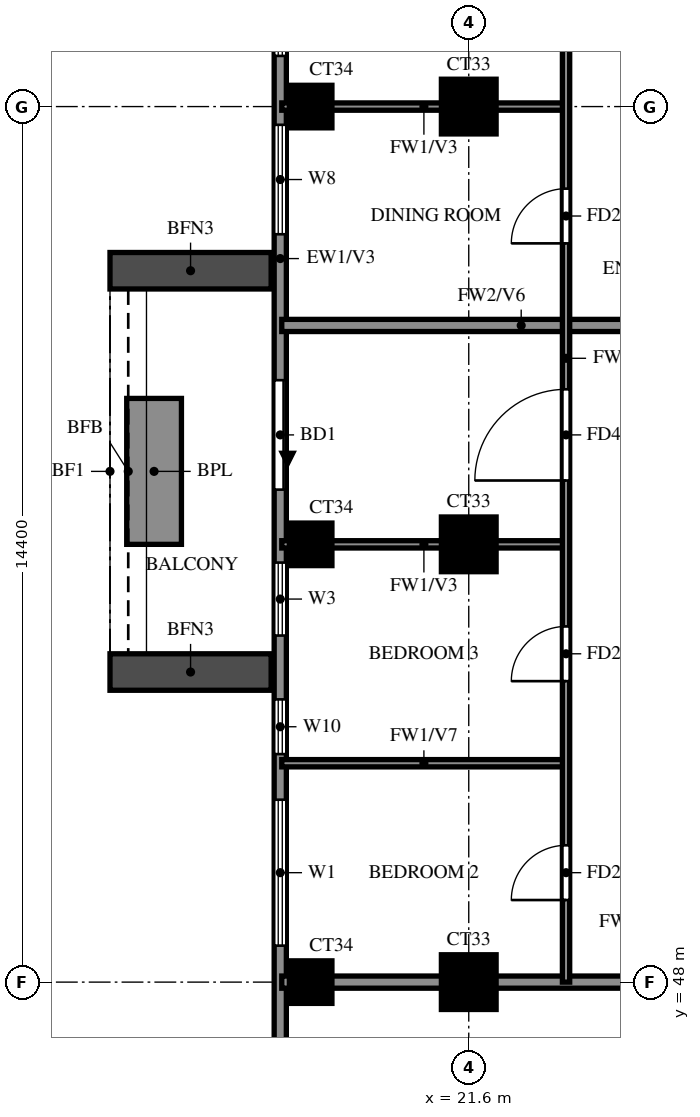
"""IFC4 building model, lengths in metres.
Left out: names, types, materials, properties, quantities, classifications, styles, units other than length and angle.
Written with IfcOpenShell. Run it as: python <this file> out.ifc"""

import sys

from ifc_helpers import new_model, si_unit, direction, frame, frame_2d, origin, origin_2d, place, context, subcontext, project, spatial, rectangle, extrude, source, transform, mapped, element, fill, save


model = new_model("IFC4")
c1 = context("Model", 3, precision=1e-05, world=origin(), true_north=direction((0.0, 1.0)))
c2 = subcontext(c1, "Body", "Model", "MODEL_VIEW")
j1 = project(units=[si_unit("LENGTHUNIT", "METRE"), si_unit("PLANEANGLEUNIT", "RADIAN")], contexts=[c1])
p1 = place(None, origin())
s1 = spatial("IfcSite", under=j1, at=p1, CompositionType="ELEMENT")
p2 = place(p1, origin())
s2 = spatial("IfcBuilding", under=s1, at=p2, CompositionType="ELEMENT")
p3 = place(p2, frame((0.0, 0.0, 218.5)))
s3 = spatial("IfcBuildingStorey", under=s2, at=p3, CompositionType="ELEMENT", Elevation=218.5)
m1 = source(origin(), c2, "Body", "SweptSolid", [
    extrude(rectangle(XDim=0.7, YDim=0.7, at=origin_2d()), origin(), (0.0, 0.0, 1.0), 3.22),
])
p4 = place(p3, frame((19.0, 48.0, 0.0), z_axis=(0.0, 0.0, 1.0), x_axis=(1.0, 0.0, 0.0)))
e1 = element("IfcColumn", 1, at=p4, inside=s3, PredefinedType="COLUMN", context=c2, shape_type="MappedRepresentation", body=[
    mapped(m1, transform((0.0, 0.0, 0.0))),
])
m2 = source(origin(), c2, "Body", "SweptSolid", [
    extrude(rectangle(XDim=0.9, YDim=0.9, at=origin_2d()), origin(), (0.0, 0.0, 1.0), 3.22),
])
p5 = place(p3, frame((21.6, 48.0, 0.0), z_axis=(0.0, 0.0, 1.0), x_axis=(1.0, 0.0, 0.0)))
e2 = element("IfcColumn", 2, at=p5, inside=s3, PredefinedType="COLUMN", context=c2, shape_type="MappedRepresentation", body=[
    mapped(m2, transform((0.0, 0.0, 0.0))),
])
p6 = place(p3, frame((19.0, 55.2, 0.0), z_axis=(0.0, 0.0, 1.0), x_axis=(1.0, 0.0, 0.0)))
e3 = element("IfcColumn", 3, at=p6, inside=s3, PredefinedType="COLUMN", context=c2, shape_type="MappedRepresentation", body=[
    mapped(m1, transform((0.0, 0.0, 0.0))),
])
p7 = place(p3, frame((21.6, 55.2, 0.0), z_axis=(0.0, 0.0, 1.0), x_axis=(1.0, 0.0, 0.0)))
e4 = element("IfcColumn", 4, at=p7, inside=s3, PredefinedType="COLUMN", context=c2, shape_type="MappedRepresentation", body=[
    mapped(m2, transform((0.0, 0.0, 0.0))),
])
p8 = place(p3, frame((19.0, 62.4, 0.0), z_axis=(0.0, 0.0, 1.0), x_axis=(1.0, 0.0, 0.0)))
e5 = element("IfcColumn", 5, at=p8, inside=s3, PredefinedType="COLUMN", context=c2, shape_type="MappedRepresentation", body=[
    mapped(m1, transform((0.0, 0.0, 0.0))),
])
p9 = place(p3, frame((21.6, 62.4, 0.0), z_axis=(0.0, 0.0, 1.0), x_axis=(1.0, 0.0, 0.0)))
e6 = element("IfcColumn", 6, at=p9, inside=s3, PredefinedType="COLUMN", context=c2, shape_type="MappedRepresentation", body=[
    mapped(m2, transform((0.0, 0.0, 0.0))),
])
p10 = place(p3, frame((18.5, 76.6, 0.0), z_axis=(0.0, 0.0, 1.0), x_axis=(0.0, -1.0, 0.0)))
e7 = element("IfcWall", 7, at=p10, inside=s3, PredefinedType="SOLIDWALL", context=c2, shape_type="SweptSolid", body=[
    extrude(rectangle(XDim=33.4, YDim=0.2, at=frame_2d((16.7, 0.0))), origin(), (0.0, 0.0, 1.0), 3.22),
])
p11 = place(p10, frame((18.7, 0.0, 0.0)))
e8 = element("IfcOpeningElement", 8, at=p11, cuts=e7, PredefinedType="OPENING", context=c2, shape_type="SweptSolid", body=[
    extrude(rectangle(XDim=1.8, YDim=2.4, at=frame_2d((0.9, 1.2))), frame((0.0, 0.11, 0.0), z_axis=(0.0, -1.0, 0.0), x_axis=(1.0, 0.0, 0.0)), (0.0, 0.0, 1.0), 0.22),
])
p12 = place(p10, frame((29.7, 0.0, 0.6)))
e9 = element("IfcOpeningElement", 9, at=p12, cuts=e7, PredefinedType="OPENING", context=c2, shape_type="SweptSolid", body=[
    extrude(rectangle(XDim=2.4, YDim=2.4, at=frame_2d((1.2, 1.2))), frame((0.0, 0.11, 0.0), z_axis=(0.0, -1.0, 0.0), x_axis=(1.0, 0.0, 0.0)), (0.0, 0.0, 1.0), 0.22),
])
p13 = place(p10, frame((25.6, 0.0, 0.6)))
e10 = element("IfcOpeningElement", 10, at=p13, cuts=e7, PredefinedType="OPENING", context=c2, shape_type="SweptSolid", body=[
    extrude(rectangle(XDim=2.4, YDim=2.4, at=frame_2d((1.2, 1.2))), frame((0.0, 0.11, 0.0), z_axis=(0.0, -1.0, 0.0), x_axis=(1.0, 0.0, 0.0)), (0.0, 0.0, 1.0), 0.22),
])
p14 = place(p10, frame((21.7, 0.0, 0.6)))
e11 = element("IfcOpeningElement", 11, at=p14, cuts=e7, PredefinedType="OPENING", context=c2, shape_type="SweptSolid", body=[
    extrude(rectangle(XDim=1.2, YDim=2.4, at=frame_2d((0.6, 1.2))), frame((0.0, 0.11, 0.0), z_axis=(0.0, -1.0, 0.0), x_axis=(1.0, 0.0, 0.0)), (0.0, 0.0, 1.0), 0.22),
])
p15 = place(p10, frame((23.95, 0.0, 0.6)))
e12 = element("IfcOpeningElement", 12, at=p15, cuts=e7, PredefinedType="OPENING", context=c2, shape_type="SweptSolid", body=[
    extrude(rectangle(XDim=0.9, YDim=2.4, at=frame_2d((0.45, 1.2))), frame((0.0, 0.11, 0.0), z_axis=(0.0, -1.0, 0.0), x_axis=(1.0, 0.0, 0.0)), (0.0, 0.0, 1.0), 0.22),
])
p16 = place(p10, frame((14.5, 0.0, 0.6)))
e13 = element("IfcOpeningElement", 13, at=p16, cuts=e7, PredefinedType="OPENING", context=c2, shape_type="SweptSolid", body=[
    extrude(rectangle(XDim=1.8, YDim=2.4, at=frame_2d((0.9, 1.2))), frame((0.0, 0.11, 0.0), z_axis=(0.0, -1.0, 0.0), x_axis=(1.0, 0.0, 0.0)), (0.0, 0.0, 1.0), 0.22),
])
p17 = place(p10, frame((7.833, 0.0, 0.6)))
e14 = element("IfcOpeningElement", 14, at=p17, cuts=e7, PredefinedType="OPENING", context=c2, shape_type="SweptSolid", body=[
    extrude(rectangle(XDim=2.4, YDim=2.4, at=frame_2d((1.2, 1.2))), frame((0.0, 0.11, 0.0), z_axis=(0.0, -1.0, 0.0), x_axis=(1.0, 0.0, 0.0)), (0.0, 0.0, 1.0), 0.22),
])
p18 = place(p10, frame((10.967, 0.0, 0.6)))
e15 = element("IfcOpeningElement", 15, at=p18, cuts=e7, PredefinedType="OPENING", context=c2, shape_type="SweptSolid", body=[
    extrude(rectangle(XDim=2.4, YDim=2.4, at=frame_2d((1.2, 1.2))), frame((0.0, 0.11, 0.0), z_axis=(0.0, -1.0, 0.0), x_axis=(1.0, 0.0, 0.0)), (0.0, 0.0, 1.0), 0.22),
])
p19 = place(p10, frame((4.75, 0.0, 1.5)))
e16 = element("IfcOpeningElement", 16, at=p19, cuts=e7, PredefinedType="OPENING", context=c2, shape_type="SweptSolid", body=[
    extrude(rectangle(XDim=0.9, YDim=0.9, at=frame_2d((0.45, 0.45))), frame((0.0, 0.11, 0.0), z_axis=(0.0, -1.0, 0.0), x_axis=(1.0, 0.0, 0.0)), (0.0, 0.0, 1.0), 0.22),
])
p20 = place(p10, frame((0.6, 0.0, 0.6)))
e17 = element("IfcOpeningElement", 17, at=p20, cuts=e7, PredefinedType="OPENING", context=c2, shape_type="SweptSolid", body=[
    extrude(rectangle(XDim=2.4, YDim=2.4, at=frame_2d((1.2, 1.2))), frame((0.0, 0.11, 0.0), z_axis=(0.0, -1.0, 0.0), x_axis=(1.0, 0.0, 0.0)), (0.0, 0.0, 1.0), 0.22),
])
for number, where, z_axis, x_axis in (
    (18, (18.35, 59.7, 0.0), (0.0, 0.0, 1.0), (-1.0, 0.0, 0.0)),
    (19, (18.35, 53.1, 0.0), (0.0, 0.0, 1.0), (-1.0, 0.0, 0.0)),
):
    element("IfcWall", number, at=place(p3, frame(where, z_axis=z_axis, x_axis=x_axis)), inside=s3, PredefinedType="SOLIDWALL", context=c2, shape_type="SweptSolid", body=[
        extrude(rectangle(XDim=2.65, YDim=0.6, at=frame_2d((1.325, 0.0))), origin(), (0.0, 0.0, 1.0), 2.85),
    ])
p21 = place(p3, frame((16.425, 57.6, 0.0), z_axis=(0.0, 0.0, 1.0), x_axis=(0.0, -1.0, 0.0)))
e20 = element("IfcWall", 20, at=p21, inside=s3, PredefinedType="SOLIDWALL", context=c2, shape_type="SweptSolid", body=[
    extrude(rectangle(XDim=2.4, YDim=0.9, at=frame_2d((1.2, 0.0))), origin(), (0.0, 0.0, 1.0), 0.9),
])
p22 = place(p3, frame((18.525, 48.0, 0.0), z_axis=(0.0, 0.0, 1.0), x_axis=(1.0, 0.0, 0.0)))
e21 = element("IfcWall", 21, at=p22, inside=s3, PredefinedType="SOLIDWALL", context=c2, shape_type="SweptSolid", body=[
    extrude(rectangle(XDim=15.075, YDim=0.2, at=frame_2d((7.538, 0.0))), origin(), (0.0, 0.0, 1.0), 3.22),
])
p23 = place(p3, frame((18.525, 58.8, 0.0), z_axis=(0.0, 0.0, 1.0), x_axis=(1.0, 0.0, 0.0)))
e22 = element("IfcWall", 22, at=p23, inside=s3, PredefinedType="SOLIDWALL", context=c2, shape_type="SweptSolid", body=[
    extrude(rectangle(XDim=7.875, YDim=0.2, at=frame_2d((3.938, 0.0))), origin(), (0.0, 0.0, 1.0), 2.32),
])
p24 = place(p3, frame((18.525, 51.6, 0.0), z_axis=(0.0, 0.0, 1.0), x_axis=(1.0, 0.0, 0.0)))
e23 = element("IfcWall", 23, at=p24, inside=s3, PredefinedType="PARTITIONING", context=c2, shape_type="SweptSolid", body=[
    extrude(rectangle(XDim=4.675, YDim=0.12, at=frame_2d((2.337, 0.0))), origin(), (0.0, 0.0, 1.0), 2.32),
])
for number, where, z_axis, x_axis in (
    (24, (18.525, 55.2, 0.0), (0.0, 0.0, 1.0), (1.0, 0.0, 0.0)),
    (25, (18.525, 62.4, 0.0), (0.0, 0.0, 1.0), (1.0, 0.0, 0.0)),
):
    element("IfcWall", number, at=place(p3, frame(where, z_axis=z_axis, x_axis=x_axis)), inside=s3, PredefinedType="PARTITIONING", context=c2, shape_type="SweptSolid", body=[
        extrude(rectangle(XDim=4.675, YDim=0.12, at=frame_2d((2.337, 0.0))), origin(), (0.0, 0.0, 1.0), 3.22),
    ])
p25 = place(p3, frame((23.2, 48.0, 0.0), z_axis=(0.0, 0.0, 1.0), x_axis=(0.0, 1.0, 0.0)))
e26 = element("IfcWall", 26, at=p25, inside=s3, PredefinedType="PARTITIONING", context=c2, shape_type="SweptSolid", body=[
    extrude(rectangle(XDim=21.6, YDim=0.12, at=frame_2d((10.8, 0.0))), origin(), (0.0, 0.0, 1.0), 3.22),
])
p26 = place(p25, frame((1.35, 0.0, 0.0)))
e27 = element("IfcOpeningElement", 27, at=p26, cuts=e26, PredefinedType="OPENING", context=c2, shape_type="SweptSolid", body=[
    extrude(rectangle(XDim=0.9, YDim=2.1, at=frame_2d((0.45, 1.05))), frame((0.0, 0.07, 0.0), z_axis=(0.0, -1.0, 0.0), x_axis=(1.0, 0.0, 0.0)), (0.0, 0.0, 1.0), 0.14),
])
p27 = place(p25, frame((4.95, 0.0, 0.0)))
e28 = element("IfcOpeningElement", 28, at=p27, cuts=e26, PredefinedType="OPENING", context=c2, shape_type="SweptSolid", body=[
    extrude(rectangle(XDim=0.9, YDim=2.1, at=frame_2d((0.45, 1.05))), frame((0.0, 0.07, 0.0), z_axis=(0.0, -1.0, 0.0), x_axis=(1.0, 0.0, 0.0)), (0.0, 0.0, 1.0), 0.14),
])
p28 = place(p25, frame((8.25, 0.0, 0.0)))
e29 = element("IfcOpeningElement", 29, at=p28, cuts=e26, PredefinedType="OPENING", context=c2, shape_type="SweptSolid", body=[
    extrude(rectangle(XDim=1.5, YDim=2.1, at=frame_2d((0.75, 1.05))), frame((0.0, 0.07, 0.0), z_axis=(0.0, -1.0, 0.0), x_axis=(1.0, 0.0, 0.0)), (0.0, 0.0, 1.0), 0.14),
])
p29 = place(p25, frame((12.15, 0.0, 0.0)))
e30 = element("IfcOpeningElement", 30, at=p29, cuts=e26, PredefinedType="OPENING", context=c2, shape_type="SweptSolid", body=[
    extrude(rectangle(XDim=0.9, YDim=2.1, at=frame_2d((0.45, 1.05))), frame((0.0, 0.07, 0.0), z_axis=(0.0, -1.0, 0.0), x_axis=(1.0, 0.0, 0.0)), (0.0, 0.0, 1.0), 0.14),
])
p30 = place(p25, frame((17.55, 0.0, 0.0)))
e31 = element("IfcOpeningElement", 31, at=p30, cuts=e26, PredefinedType="OPENING", context=c2, shape_type="SweptSolid", body=[
    extrude(rectangle(XDim=0.9, YDim=2.1, at=frame_2d((0.45, 1.05))), frame((0.0, 0.07, 0.0), z_axis=(0.0, -1.0, 0.0), x_axis=(1.0, 0.0, 0.0)), (0.0, 0.0, 1.0), 0.14),
])
p31 = place(p11, origin())
e32 = element("IfcDoor", 32, at=p31, inside=s3, OperationType="DOUBLE_DOOR_SLIDING", PredefinedType="DOOR", context=c2, shape_type="SweptSolid", body=[
    extrude(rectangle(XDim=1.8, YDim=2.4, at=frame_2d((0.9, 1.2))), frame((0.0, 0.025, 0.0), z_axis=(0.0, -1.0, 0.0), x_axis=(1.0, 0.0, 0.0)), (0.0, 0.0, 1.0), 0.05),
])
fill(e8, e32)
p32 = place(p13, origin())
e33 = element("IfcWindow", 33, at=p32, inside=s3, PartitioningType="DOUBLE_PANEL_VERTICAL", PredefinedType="WINDOW", context=c2, shape_type="SweptSolid", body=[
    extrude(rectangle(XDim=2.4, YDim=2.4, at=frame_2d((1.2, 1.2))), frame((0.0, 0.03, 0.0), z_axis=(0.0, -1.0, 0.0), x_axis=(1.0, 0.0, 0.0)), (0.0, 0.0, 1.0), 0.06),
])
fill(e10, e33)
p33 = place(p14, origin())
e34 = element("IfcWindow", 34, at=p33, inside=s3, PartitioningType="SINGLE_PANEL", PredefinedType="WINDOW", context=c2, shape_type="SweptSolid", body=[
    extrude(rectangle(XDim=1.2, YDim=2.4, at=frame_2d((0.6, 1.2))), frame((0.0, 0.03, 0.0), z_axis=(0.0, -1.0, 0.0), x_axis=(1.0, 0.0, 0.0)), (0.0, 0.0, 1.0), 0.06),
])
fill(e11, e34)
p34 = place(p15, origin())
e35 = element("IfcWindow", 35, at=p34, inside=s3, PartitioningType="SINGLE_PANEL", PredefinedType="WINDOW", context=c2, shape_type="SweptSolid", body=[
    extrude(rectangle(XDim=0.9, YDim=2.4, at=frame_2d((0.45, 1.2))), frame((0.0, 0.03, 0.0), z_axis=(0.0, -1.0, 0.0), x_axis=(1.0, 0.0, 0.0)), (0.0, 0.0, 1.0), 0.06),
])
fill(e12, e35)
p35 = place(p16, origin())
e36 = element("IfcWindow", 36, at=p35, inside=s3, PartitioningType="DOUBLE_PANEL_VERTICAL", PredefinedType="WINDOW", context=c2, shape_type="SweptSolid", body=[
    extrude(rectangle(XDim=1.8, YDim=2.4, at=frame_2d((0.9, 1.2))), frame((0.0, 0.03, 0.0), z_axis=(0.0, -1.0, 0.0), x_axis=(1.0, 0.0, 0.0)), (0.0, 0.0, 1.0), 0.06),
])
fill(e13, e36)
p36 = place(p18, origin())
e37 = element("IfcWindow", 37, at=p36, inside=s3, PartitioningType="DOUBLE_PANEL_VERTICAL", PredefinedType="WINDOW", context=c2, shape_type="SweptSolid", body=[
    extrude(rectangle(XDim=2.4, YDim=2.4, at=frame_2d((1.2, 1.2))), frame((0.0, 0.03, 0.0), z_axis=(0.0, -1.0, 0.0), x_axis=(1.0, 0.0, 0.0)), (0.0, 0.0, 1.0), 0.06),
])
fill(e15, e37)
p37 = place(p26, origin())
e38 = element("IfcDoor", 38, at=p37, inside=s3, OperationType="SINGLE_SWING_LEFT", PredefinedType="DOOR", context=c2, shape_type="SweptSolid", body=[
    extrude(rectangle(XDim=0.9, YDim=2.1, at=frame_2d((0.45, 1.05))), frame((0.0, 0.025, 0.0), z_axis=(0.0, -1.0, 0.0), x_axis=(1.0, 0.0, 0.0)), (0.0, 0.0, 1.0), 0.05),
])
fill(e27, e38)
p38 = place(p27, origin())
e39 = element("IfcDoor", 39, at=p38, inside=s3, OperationType="SINGLE_SWING_RIGHT", PredefinedType="DOOR", context=c2, shape_type="SweptSolid", body=[
    extrude(rectangle(XDim=0.9, YDim=2.1, at=frame_2d((0.45, 1.05))), frame((0.0, 0.025, 0.0), z_axis=(0.0, -1.0, 0.0), x_axis=(1.0, 0.0, 0.0)), (0.0, 0.0, 1.0), 0.05),
])
fill(e28, e39)
p39 = place(p28, origin())
e40 = element("IfcDoor", 40, at=p39, inside=s3, OperationType="SINGLE_SWING_LEFT", PredefinedType="DOOR", context=c2, shape_type="SweptSolid", body=[
    extrude(rectangle(XDim=1.5, YDim=2.1, at=frame_2d((0.75, 1.05))), frame((0.0, 0.025, 0.0), z_axis=(0.0, -1.0, 0.0), x_axis=(1.0, 0.0, 0.0)), (0.0, 0.0, 1.0), 0.05),
])
fill(e29, e40)
p40 = place(p29, origin())
e41 = element("IfcDoor", 41, at=p40, inside=s3, OperationType="SINGLE_SWING_LEFT", PredefinedType="DOOR", context=c2, shape_type="SweptSolid", body=[
    extrude(rectangle(XDim=0.9, YDim=2.1, at=frame_2d((0.45, 1.05))), frame((0.0, 0.025, 0.0), z_axis=(0.0, -1.0, 0.0), x_axis=(1.0, 0.0, 0.0)), (0.0, 0.0, 1.0), 0.05),
])
fill(e30, e41)
save(model, sys.argv[1])
